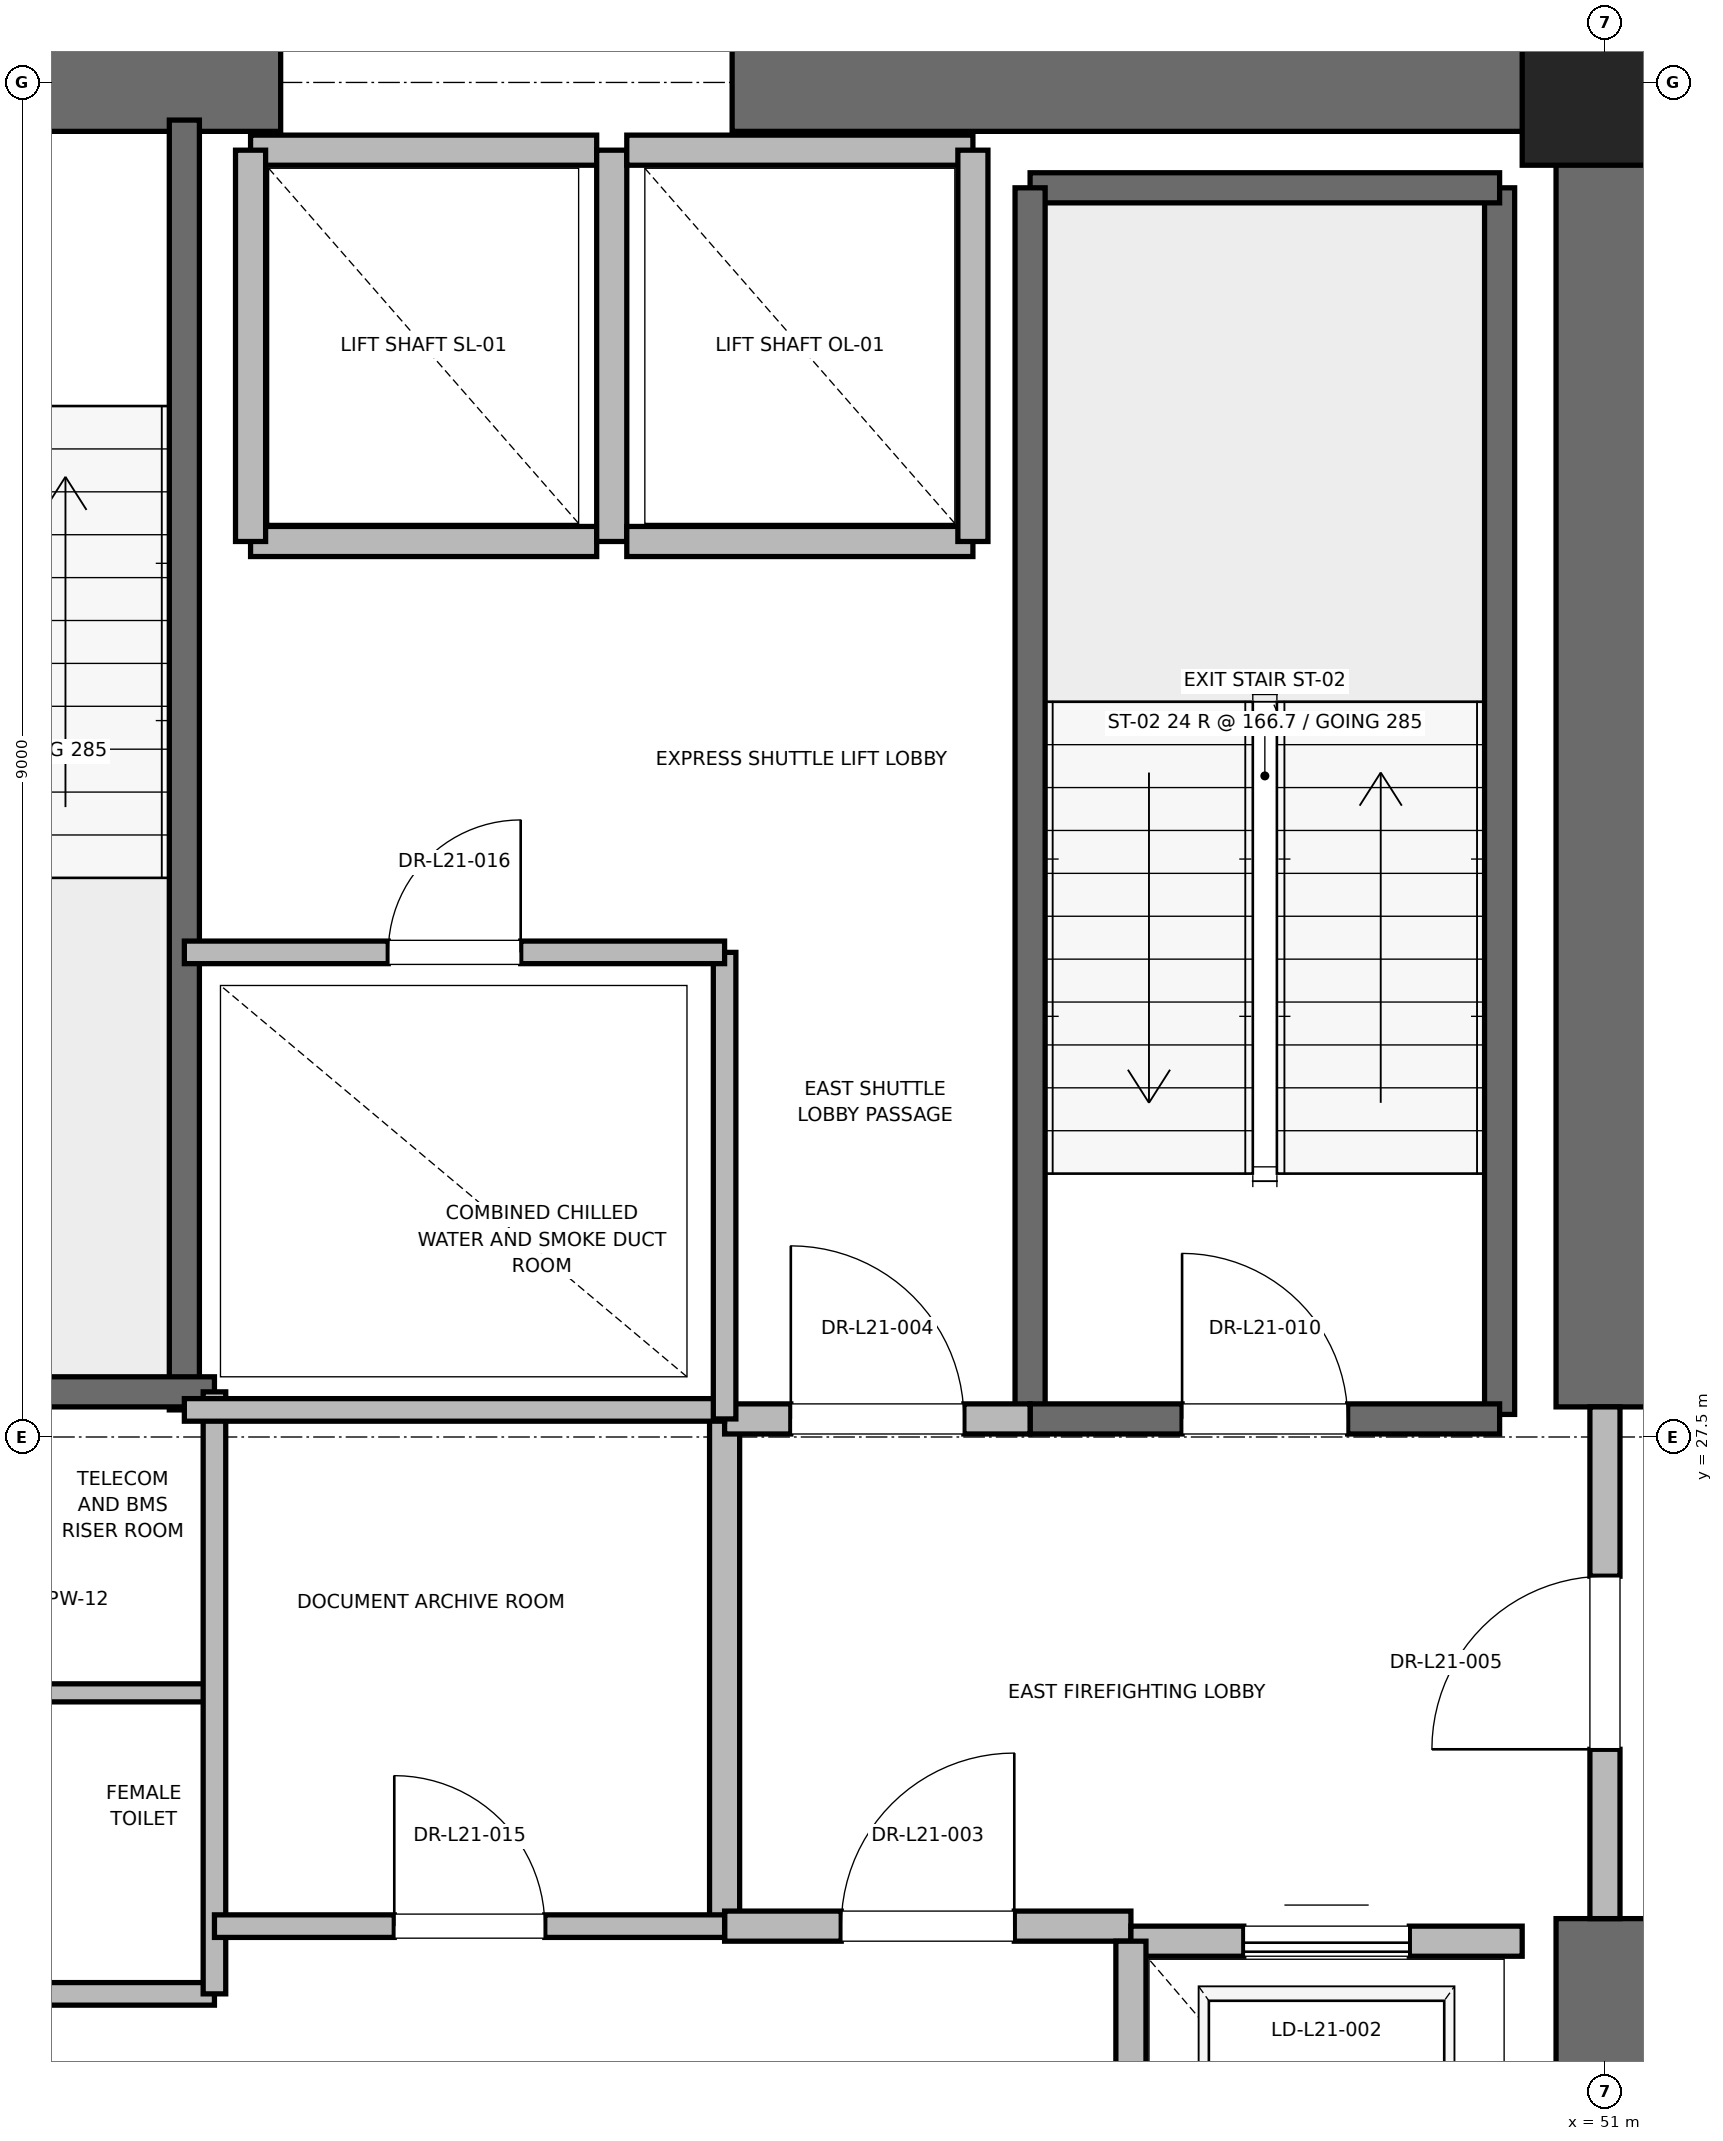
"""IFC4 building model, lengths in metres.
Left out: names, types, materials, properties, quantities, classifications, styles, units other than length and angle.
Written with IfcOpenShell. Run it as: python <this file> out.ifc"""

import sys

from ifc_helpers import new_model, si_unit, direction, frame, frame_2d, origin, origin_2d, place, context, subcontext, project, spatial, rectangle, extrude, element, fill, save


model = new_model("IFC4")
c1 = context("Model", 3, precision=1e-05, world=origin(), true_north=direction((0.0, 1.0)))
c2 = subcontext(c1, "Body", "Model", "MODEL_VIEW")
j1 = project(units=[si_unit("LENGTHUNIT", "METRE"), si_unit("PLANEANGLEUNIT", "RADIAN")], contexts=[c1])
p1 = place(None, origin())
s1 = spatial("IfcSite", under=j1, at=p1, CompositionType="ELEMENT")
p2 = place(p1, origin())
s2 = spatial("IfcBuilding", under=s1, at=p2, CompositionType="ELEMENT")
p3 = place(p2, frame((0.0, 0.0, 91.6)))
s3 = spatial("IfcBuildingStorey", under=s2, at=p3, CompositionType="ELEMENT", Elevation=91.6)
p4 = place(p3, frame((51.0, 36.5, 0.0), z_axis=(0.0, 0.0, 1.0), x_axis=(1.0, 0.0, 0.0)))
e1 = element("IfcColumn", 1, at=p4, inside=s3, PredefinedType="PILASTER", context=c2, shape_type="SweptSolid", body=[
    extrude(rectangle(XDim=1.1, YDim=1.1, at=origin_2d()), origin(), (0.0, 0.0, 1.0), 4.0),
])
p5 = place(p3, frame((37.8, 36.5, 0.0), z_axis=(0.0, 0.0, 1.0), x_axis=(1.0, 0.0, 0.0)))
e2 = element("IfcWall", 2, at=p5, inside=s3, PredefinedType="SHEAR", context=c2, shape_type="SweptSolid", body=[
    extrude(rectangle(XDim=4.4, YDim=0.65, at=frame_2d((2.2, 0.0))), origin(), (0.0, 0.0, 1.0), 3.76),
])
p6 = place(p5, frame((1.65, 0.0, 0.0)))
e3 = element("IfcOpeningElement", 3, at=p6, cuts=e2, PredefinedType="OPENING", context=c2, shape_type="SweptSolid", body=[
    extrude(rectangle(XDim=1.1, YDim=2.15, at=frame_2d((0.55, 1.075))), frame((0.0, 0.325, 0.0), z_axis=(0.0, -1.0, 0.0), x_axis=(1.0, 0.0, 0.0)), (0.0, 0.0, 1.0), 0.65),
])
for number, where, z_axis, x_axis in (
    (4, (45.2, 36.5, 0.0), (0.0, 0.0, 1.0), (1.0, 0.0, 0.0)),
    (5, (51.0, 18.5, 0.0), (0.0, 0.0, 1.0), (0.0, 1.0, 0.0)),
):
    element("IfcWall", number, at=place(p3, frame(where, z_axis=z_axis, x_axis=x_axis)), inside=s3, PredefinedType="SHEAR", context=c2, shape_type="SweptSolid", body=[
        extrude(rectangle(XDim=5.8, YDim=0.65, at=frame_2d((2.9, 0.0))), origin(), (0.0, 0.0, 1.0), 3.76),
    ])
p7 = place(p3, frame((51.0, 27.7, 0.0), z_axis=(0.0, 0.0, 1.0), x_axis=(0.0, 1.0, 0.0)))
e6 = element("IfcWall", 6, at=p7, inside=s3, PredefinedType="SHEAR", context=c2, shape_type="SweptSolid", body=[
    extrude(rectangle(XDim=8.8, YDim=0.65, at=frame_2d((4.4, 0.0))), origin(), (0.0, 0.0, 1.0), 3.76),
])
p8 = place(p3, frame((50.3, 27.65, 0.0), z_axis=(0.0, 0.0, 1.0), x_axis=(0.0, 1.0, 0.0)))
e7 = element("IfcWall", 7, at=p8, inside=s3, PredefinedType="SOLIDWALL", context=c2, shape_type="SweptSolid", body=[
    extrude(rectangle(XDim=8.15, YDim=0.2, at=frame_2d((4.075, 0.0))), origin(), (0.0, 0.0, 1.0), 3.76),
])
p9 = place(p3, frame((47.18, 35.8, 0.0), z_axis=(0.0, 0.0, 1.0), x_axis=(1.0, 0.0, 0.0)))
e8 = element("IfcWall", 8, at=p9, inside=s3, PredefinedType="SOLIDWALL", context=c2, shape_type="SweptSolid", body=[
    extrude(rectangle(XDim=3.12, YDim=0.2, at=frame_2d((1.56, 0.0))), origin(), (0.0, 0.0, 1.0), 3.76),
])
p10 = place(p3, frame((47.18, 27.62, 0.0), z_axis=(0.0, 0.0, 1.0), x_axis=(0.0, 1.0, 0.0)))
e9 = element("IfcWall", 9, at=p10, inside=s3, PredefinedType="SOLIDWALL", context=c2, shape_type="SweptSolid", body=[
    extrude(rectangle(XDim=8.18, YDim=0.2, at=frame_2d((4.09, 0.0))), origin(), (0.0, 0.0, 1.0), 3.76),
])
p11 = place(p3, frame((47.18, 27.62, 0.0), z_axis=(0.0, 0.0, 1.0), x_axis=(1.0, 0.0, 0.0)))
e10 = element("IfcWall", 10, at=p11, inside=s3, PredefinedType="SOLIDWALL", context=c2, shape_type="SweptSolid", body=[
    extrude(rectangle(XDim=3.12, YDim=0.2, at=frame_2d((1.56, 0.0))), origin(), (0.0, 0.0, 1.0), 3.76),
])
p12 = place(p11, frame((1.01, 0.0, 0.0)))
e11 = element("IfcOpeningElement", 11, at=p12, cuts=e10, PredefinedType="OPENING", context=c2, shape_type="SweptSolid", body=[
    extrude(rectangle(XDim=1.1, YDim=2.15, at=frame_2d((0.55, 1.075))), frame((0.0, 0.1, 0.0), z_axis=(0.0, -1.0, 0.0), x_axis=(1.0, 0.0, 0.0)), (0.0, 0.0, 1.0), 0.2),
])
p13 = place(p3, frame((41.56, 27.68, 0.0), z_axis=(0.0, 0.0, 1.0), x_axis=(0.0, 1.0, 0.0)))
e12 = element("IfcWall", 12, at=p13, inside=s3, PredefinedType="SOLIDWALL", context=c2, shape_type="SweptSolid", body=[
    extrude(rectangle(XDim=8.57, YDim=0.2, at=frame_2d((4.285, 0.0))), origin(), (0.0, 0.0, 1.0), 3.76),
])
p14 = place(p3, frame((38.44, 27.8, 0.0), z_axis=(0.0, 0.0, 1.0), x_axis=(1.0, 0.0, 0.0)))
e13 = element("IfcWall", 13, at=p14, inside=s3, PredefinedType="SOLIDWALL", context=c2, shape_type="SweptSolid", body=[
    extrude(rectangle(XDim=3.32, YDim=0.2, at=frame_2d((1.66, 0.0))), origin(), (0.0, 0.0, 1.0), 3.76),
])
p15 = place(p3, frame((45.15, 24.25, 0.0), z_axis=(0.0, 0.0, 1.0), x_axis=(0.0, 1.0, 0.0)))
e14 = element("IfcWall", 14, at=p15, inside=s3, PredefinedType="PARTITIONING", context=c2, shape_type="SweptSolid", body=[
    extrude(rectangle(XDim=3.37, YDim=0.2, at=frame_2d((1.685, 0.0))), origin(), (0.0, 0.0, 1.0), 3.76),
])
p16 = place(p3, frame((45.15, 24.25, 0.0), z_axis=(0.0, 0.0, 1.0), x_axis=(1.0, 0.0, 0.0)))
e15 = element("IfcWall", 15, at=p16, inside=s3, PredefinedType="PARTITIONING", context=c2, shape_type="SweptSolid", body=[
    extrude(rectangle(XDim=2.7, YDim=0.2, at=frame_2d((1.35, 0.0))), origin(), (0.0, 0.0, 1.0), 3.76),
])
p17 = place(p16, frame((0.775, 0.0, 0.0)))
e16 = element("IfcOpeningElement", 16, at=p17, cuts=e15, PredefinedType="OPENING", context=c2, shape_type="SweptSolid", body=[
    extrude(rectangle(XDim=1.15, YDim=2.2, at=frame_2d((0.575, 1.1))), frame((0.0, 0.1, 0.0), z_axis=(0.0, -1.0, 0.0), x_axis=(1.0, 0.0, 0.0)), (0.0, 0.0, 1.0), 0.2),
])
p18 = place(p3, frame((45.15, 27.62, 0.0), z_axis=(0.0, 0.0, 1.0), x_axis=(1.0, 0.0, 0.0)))
e17 = element("IfcWall", 17, at=p18, inside=s3, PredefinedType="PARTITIONING", context=c2, shape_type="SweptSolid", body=[
    extrude(rectangle(XDim=2.03, YDim=0.2, at=frame_2d((1.015, 0.0))), origin(), (0.0, 0.0, 1.0), 3.76),
])
p19 = place(p18, frame((0.44, 0.0, 0.0)))
e18 = element("IfcOpeningElement", 18, at=p19, cuts=e17, PredefinedType="OPENING", context=c2, shape_type="SweptSolid", body=[
    extrude(rectangle(XDim=1.15, YDim=2.2, at=frame_2d((0.575, 1.1))), frame((0.0, 0.1, 0.0), z_axis=(0.0, -1.0, 0.0), x_axis=(1.0, 0.0, 0.0)), (0.0, 0.0, 1.0), 0.2),
])
p20 = place(p3, frame((51.0, 24.3, 0.0), z_axis=(0.0, 0.0, 1.0), x_axis=(0.0, 1.0, 0.0)))
e19 = element("IfcWall", 19, at=p20, inside=s3, PredefinedType="PARTITIONING", context=c2, shape_type="SweptSolid", body=[
    extrude(rectangle(XDim=3.4, YDim=0.2, at=frame_2d((1.7, 0.0))), origin(), (0.0, 0.0, 1.0), 2.54),
])
p21 = place(p20, frame((1.125, 0.0, 0.0)))
e20 = element("IfcOpeningElement", 20, at=p21, cuts=e19, PredefinedType="OPENING", context=c2, shape_type="SweptSolid", body=[
    extrude(rectangle(XDim=1.15, YDim=2.2, at=frame_2d((0.575, 1.1))), frame((0.0, 0.1, 0.0), z_axis=(0.0, -1.0, 0.0), x_axis=(1.0, 0.0, 0.0)), (0.0, 0.0, 1.0), 0.2),
])
p22 = place(p3, frame((50.45, 24.15, 0.0), z_axis=(0.0, 0.0, 1.0), x_axis=(-1.0, 0.0, 0.0)))
e21 = element("IfcWall", 21, at=p22, inside=s3, PredefinedType="SOLIDWALL", context=c2, shape_type="SweptSolid", body=[
    extrude(rectangle(XDim=2.6, YDim=0.2, at=frame_2d((1.3, 0.0))), origin(), (0.0, 0.0, 1.0), 2.54),
])
p23 = place(p22, frame((0.75, 0.0, 0.0)))
e22 = element("IfcOpeningElement", 22, at=p23, cuts=e21, PredefinedType="OPENING", context=c2, shape_type="SweptSolid", body=[
    extrude(rectangle(XDim=1.1, YDim=2.2, at=frame_2d((0.55, 1.1))), frame((0.0, 0.1, 0.0), z_axis=(0.0, -1.0, 0.0), x_axis=(1.0, 0.0, 0.0)), (0.0, 0.0, 1.0), 0.2),
])
p24 = place(p3, frame((47.85, 24.15, 0.0), z_axis=(0.0, 0.0, 1.0), x_axis=(0.0, -1.0, 0.0)))
e23 = element("IfcWall", 23, at=p24, inside=s3, PredefinedType="SOLIDWALL", context=c2, shape_type="SweptSolid", body=[
    extrude(rectangle(XDim=3.0, YDim=0.2, at=frame_2d((1.5, 0.0))), origin(), (0.0, 0.0, 1.0), 3.76),
])
p25 = place(p3, frame((42.0, 33.45, 0.0), z_axis=(0.0, 0.0, 1.0), x_axis=(1.0, 0.0, 0.0)))
e24 = element("IfcWall", 24, at=p25, inside=s3, PredefinedType="SOLIDWALL", context=c2, shape_type="SweptSolid", body=[
    extrude(rectangle(XDim=2.3, YDim=0.2, at=frame_2d((1.15, 0.0))), origin(), (0.0, 0.0, 1.0), 3.76),
])
p26 = place(p3, frame((44.3, 36.05, 0.0), z_axis=(0.0, 0.0, 1.0), x_axis=(-1.0, 0.0, 0.0)))
e25 = element("IfcWall", 25, at=p26, inside=s3, PredefinedType="SOLIDWALL", context=c2, shape_type="SweptSolid", body=[
    extrude(rectangle(XDim=2.3, YDim=0.2, at=frame_2d((1.15, 0.0))), origin(), (0.0, 0.0, 1.0), 2.54),
])
for number, where, z_axis, x_axis in (
    (26, (42.0, 36.05, 0.0), (0.0, 0.0, 1.0), (0.0, -1.0, 0.0)),
    (27, (44.4, 33.45, 0.0), (0.0, 0.0, 1.0), (0.0, 1.0, 0.0)),
):
    element("IfcWall", number, at=place(p3, frame(where, z_axis=z_axis, x_axis=x_axis)), inside=s3, PredefinedType="SOLIDWALL", context=c2, shape_type="SweptSolid", body=[
        extrude(rectangle(XDim=2.6, YDim=0.2, at=frame_2d((1.3, 0.0))), origin(), (0.0, 0.0, 1.0), 2.54),
    ])
p27 = place(p3, frame((44.5, 33.45, 0.0), z_axis=(0.0, 0.0, 1.0), x_axis=(1.0, 0.0, 0.0)))
e28 = element("IfcWall", 28, at=p27, inside=s3, PredefinedType="SOLIDWALL", context=c2, shape_type="SweptSolid", body=[
    extrude(rectangle(XDim=2.3, YDim=0.2, at=frame_2d((1.15, 0.0))), origin(), (0.0, 0.0, 1.0), 3.76),
])
p28 = place(p3, frame((46.8, 36.05, 0.0), z_axis=(0.0, 0.0, 1.0), x_axis=(-1.0, 0.0, 0.0)))
e29 = element("IfcWall", 29, at=p28, inside=s3, PredefinedType="SOLIDWALL", context=c2, shape_type="SweptSolid", body=[
    extrude(rectangle(XDim=2.3, YDim=0.2, at=frame_2d((1.15, 0.0))), origin(), (0.0, 0.0, 1.0), 2.54),
])
p29 = place(p3, frame((46.8, 33.45, 0.0), z_axis=(0.0, 0.0, 1.0), x_axis=(0.0, 1.0, 0.0)))
e30 = element("IfcWall", 30, at=p29, inside=s3, PredefinedType="SOLIDWALL", context=c2, shape_type="SweptSolid", body=[
    extrude(rectangle(XDim=2.6, YDim=0.2, at=frame_2d((1.3, 0.0))), origin(), (0.0, 0.0, 1.0), 3.76),
])
p30 = place(p3, frame((39.95, 23.8, 0.0), z_axis=(0.0, 0.0, 1.0), x_axis=(1.0, 0.0, 0.0)))
e31 = element("IfcWall", 31, at=p30, inside=s3, PredefinedType="PARTITIONING", context=c2, shape_type="SweptSolid", body=[
    extrude(rectangle(XDim=1.81, YDim=0.15, at=frame_2d((0.905, 0.0))), origin(), (0.0, 0.0, 1.0), 2.85),
])
p31 = place(p3, frame((39.95, 25.8, 0.0), z_axis=(0.0, 0.0, 1.0), x_axis=(1.0, 0.0, 0.0)))
e32 = element("IfcWall", 32, at=p31, inside=s3, PredefinedType="PARTITIONING", context=c2, shape_type="SweptSolid", body=[
    extrude(rectangle(XDim=1.81, YDim=0.12, at=frame_2d((0.905, 0.0))), origin(), (0.0, 0.0, 1.0), 2.85),
])
p32 = place(p3, frame((41.76, 23.8, 0.0), z_axis=(0.0, 0.0, 1.0), x_axis=(0.0, 1.0, 0.0)))
e33 = element("IfcWall", 33, at=p32, inside=s3, PredefinedType="PARTITIONING", context=c2, shape_type="SweptSolid", body=[
    extrude(rectangle(XDim=4.0, YDim=0.15, at=frame_2d((2.0, 0.0))), origin(), (0.0, 0.0, 1.0), 2.85),
])
p33 = place(p3, frame((41.56, 27.68, 0.0), z_axis=(0.0, 0.0, 1.0), x_axis=(1.0, 0.0, 0.0)))
e34 = element("IfcWall", 34, at=p33, inside=s3, PredefinedType="PARTITIONING", context=c2, shape_type="SweptSolid", body=[
    extrude(rectangle(XDim=3.59, YDim=0.15, at=frame_2d((1.795, 0.0))), origin(), (0.0, 0.0, 1.0), 2.85),
])
p34 = place(p3, frame((41.76, 24.25, 0.0), z_axis=(0.0, 0.0, 1.0), x_axis=(1.0, 0.0, 0.0)))
e35 = element("IfcWall", 35, at=p34, inside=s3, PredefinedType="PARTITIONING", context=c2, shape_type="SweptSolid", body=[
    extrude(rectangle(XDim=3.39, YDim=0.15, at=frame_2d((1.695, 0.0))), origin(), (0.0, 0.0, 1.0), 2.85),
])
p35 = place(p34, frame((1.195, 0.0, 0.0)))
e36 = element("IfcOpeningElement", 36, at=p35, cuts=e35, PredefinedType="OPENING", context=c2, shape_type="SweptSolid", body=[
    extrude(rectangle(XDim=1.0, YDim=2.15, at=frame_2d((0.5, 1.075))), frame((0.0, 0.075, 0.0), z_axis=(0.0, -1.0, 0.0), x_axis=(1.0, 0.0, 0.0)), (0.0, 0.0, 1.0), 0.15),
])
p36 = place(p3, frame((45.15, 27.62, 0.0), z_axis=(0.0, 0.0, 1.0), x_axis=(0.0, 1.0, 0.0)))
e37 = element("IfcWall", 37, at=p36, inside=s3, PredefinedType="PARTITIONING", context=c2, shape_type="SweptSolid", body=[
    extrude(rectangle(XDim=3.1, YDim=0.15, at=frame_2d((1.55, 0.0))), origin(), (0.0, 0.0, 1.0), 2.85),
])
p37 = place(p3, frame((41.56, 30.72, 0.0), z_axis=(0.0, 0.0, 1.0), x_axis=(1.0, 0.0, 0.0)))
e38 = element("IfcWall", 38, at=p37, inside=s3, PredefinedType="PARTITIONING", context=c2, shape_type="SweptSolid", body=[
    extrude(rectangle(XDim=3.59, YDim=0.15, at=frame_2d((1.795, 0.0))), origin(), (0.0, 0.0, 1.0), 2.85),
])
p38 = place(p37, frame((1.355, 0.0, 0.0)))
e39 = element("IfcOpeningElement", 39, at=p38, cuts=e38, PredefinedType="OPENING", context=c2, shape_type="SweptSolid", body=[
    extrude(rectangle(XDim=0.88, YDim=2.1, at=frame_2d((0.44, 1.05))), frame((0.0, 0.075, 0.0), z_axis=(0.0, -1.0, 0.0), x_axis=(1.0, 0.0, 0.0)), (0.0, 0.0, 1.0), 0.15),
])
p39 = place(p12, origin())
e40 = element("IfcDoor", 40, at=p39, inside=s3, OperationType="SINGLE_SWING_LEFT", PredefinedType="DOOR", context=c2, shape_type="SweptSolid", body=[
    extrude(rectangle(XDim=1.1, YDim=2.15, at=frame_2d((0.55, 1.075))), frame((0.0, 0.025, 0.0), z_axis=(0.0, -1.0, 0.0), x_axis=(1.0, 0.0, 0.0)), (0.0, 0.0, 1.0), 0.05),
])
fill(e11, e40)
p40 = place(p17, origin())
e41 = element("IfcDoor", 41, at=p40, inside=s3, OperationType="SINGLE_SWING_RIGHT", PredefinedType="DOOR", context=c2, shape_type="SweptSolid", body=[
    extrude(rectangle(XDim=1.15, YDim=2.2, at=frame_2d((0.575, 1.1))), frame((0.0, 0.025, 0.0), z_axis=(0.0, -1.0, 0.0), x_axis=(1.0, 0.0, 0.0)), (0.0, 0.0, 1.0), 0.05),
])
fill(e16, e41)
p41 = place(p19, origin())
e42 = element("IfcDoor", 42, at=p41, inside=s3, OperationType="SINGLE_SWING_LEFT", PredefinedType="DOOR", context=c2, shape_type="SweptSolid", body=[
    extrude(rectangle(XDim=1.15, YDim=2.2, at=frame_2d((0.575, 1.1))), frame((0.0, 0.025, 0.0), z_axis=(0.0, -1.0, 0.0), x_axis=(1.0, 0.0, 0.0)), (0.0, 0.0, 1.0), 0.05),
])
fill(e18, e42)
p42 = place(p21, origin())
e43 = element("IfcDoor", 43, at=p42, inside=s3, OperationType="SINGLE_SWING_LEFT", PredefinedType="DOOR", context=c2, shape_type="SweptSolid", body=[
    extrude(rectangle(XDim=1.15, YDim=2.2, at=frame_2d((0.575, 1.1))), frame((0.0, 0.025, 0.0), z_axis=(0.0, -1.0, 0.0), x_axis=(1.0, 0.0, 0.0)), (0.0, 0.0, 1.0), 0.05),
])
fill(e20, e43)
p43 = place(p23, origin())
e44 = element("IfcDoor", 44, at=p43, inside=s3, OperationType="SLIDING_TO_RIGHT", PredefinedType="DOOR", context=c2, shape_type="SweptSolid", body=[
    extrude(rectangle(XDim=1.1, YDim=2.2, at=frame_2d((0.55, 1.1))), frame((0.0, 0.025, 0.0), z_axis=(0.0, -1.0, 0.0), x_axis=(1.0, 0.0, 0.0)), (0.0, 0.0, 1.0), 0.05),
])
fill(e22, e44)
p44 = place(p35, origin())
e45 = element("IfcDoor", 45, at=p44, inside=s3, OperationType="SINGLE_SWING_LEFT", PredefinedType="DOOR", context=c2, shape_type="SweptSolid", body=[
    extrude(rectangle(XDim=1.0, YDim=2.15, at=frame_2d((0.5, 1.075))), frame((0.0, 0.025, 0.0), z_axis=(0.0, -1.0, 0.0), x_axis=(1.0, 0.0, 0.0)), (0.0, 0.0, 1.0), 0.05),
])
fill(e36, e45)
p45 = place(p38, origin())
e46 = element("IfcDoor", 46, at=p45, inside=s3, OperationType="SINGLE_SWING_RIGHT", PredefinedType="DOOR", context=c2, shape_type="SweptSolid", body=[
    extrude(rectangle(XDim=0.88, YDim=2.1, at=frame_2d((0.44, 1.05))), frame((0.0, 0.025, 0.0), z_axis=(0.0, -1.0, 0.0), x_axis=(1.0, 0.0, 0.0)), (0.0, 0.0, 1.0), 0.05),
])
fill(e39, e46)
save(model, sys.argv[1])
